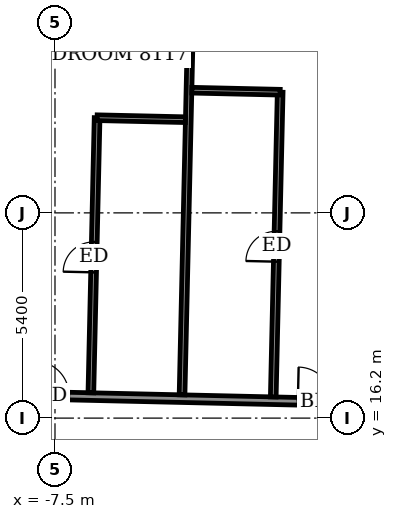
"""IFC4 building model, lengths in metres.
Left out: names, types, materials, properties, quantities, classifications, styles, units other than length and angle.
Written with IfcOpenShell. Run it as: python <this file> out.ifc"""

import sys

from ifc_helpers import new_model, si_unit, direction, frame, frame_2d, origin, place, context, subcontext, project, spatial, rectangle, extrude, element, fill, save


model = new_model("IFC4")
c1 = context("Model", 3, precision=1e-05, world=origin(), true_north=direction((0.0, 1.0)))
c2 = subcontext(c1, "Body", "Model", "MODEL_VIEW")
j1 = project(units=[si_unit("LENGTHUNIT", "METRE"), si_unit("PLANEANGLEUNIT", "RADIAN")], contexts=[c1])
p1 = place(None, origin())
s1 = spatial("IfcSite", under=j1, at=p1, CompositionType="ELEMENT")
p2 = place(p1, origin())
s2 = spatial("IfcBuilding", under=s1, at=p2, CompositionType="ELEMENT")
p3 = place(p2, frame((0.0, 0.0, 316.9)))
s3 = spatial("IfcBuildingStorey", under=s2, at=p3, CompositionType="ELEMENT", Elevation=316.9)
p4 = place(p3, frame((-30.652, 17.313, 0.0), z_axis=(0.0, 0.0, 1.0), x_axis=(0.999742623764, -0.02268669719, 0.0)))
e1 = element("IfcWall", 1, at=p4, inside=s3, PredefinedType="PARTITIONING", context=c2, shape_type="SweptSolid", body=[
    extrude(rectangle(XDim=58.8, YDim=0.2, at=frame_2d((29.4, 0.0))), origin(), (0.0, 0.0, 1.0), 3.05),
])
p5 = place(p4, frame((55.698, 0.0, 0.0)))
e2 = element("IfcOpeningElement", 2, at=p5, cuts=e1, PredefinedType="OPENING", context=c2, shape_type="SweptSolid", body=[
    extrude(rectangle(XDim=1.0, YDim=2.1, at=frame_2d((0.5, 1.05))), frame((0.0, 0.11, 0.0), z_axis=(0.0, -1.0, 0.0), x_axis=(1.0, 0.0, 0.0)), (0.0, 0.0, 1.0), 0.22),
])
p6 = place(p4, frame((49.0, 0.0, 0.0)))
e3 = element("IfcOpeningElement", 3, at=p6, cuts=e1, PredefinedType="OPENING", context=c2, shape_type="SweptSolid", body=[
    extrude(rectangle(XDim=0.9, YDim=2.1, at=frame_2d((0.45, 1.05))), frame((0.0, 0.11, 0.0), z_axis=(0.0, -1.0, 0.0), x_axis=(1.0, 0.0, 0.0)), (0.0, 0.0, 1.0), 0.22),
])
p7 = place(p4, frame((47.125, 0.0, 0.0)))
e4 = element("IfcOpeningElement", 4, at=p7, cuts=e1, PredefinedType="OPENING", context=c2, shape_type="SweptSolid", body=[
    extrude(rectangle(XDim=0.9, YDim=2.1, at=frame_2d((0.45, 1.05))), frame((0.0, 0.11, 0.0), z_axis=(0.0, -1.0, 0.0), x_axis=(1.0, 0.0, 0.0)), (0.0, 0.0, 1.0), 0.22),
])
p8 = place(p4, frame((40.425, 0.0, 0.0)))
e5 = element("IfcOpeningElement", 5, at=p8, cuts=e1, PredefinedType="OPENING", context=c2, shape_type="SweptSolid", body=[
    extrude(rectangle(XDim=0.9, YDim=2.1, at=frame_2d((0.45, 1.05))), frame((0.0, 0.11, 0.0), z_axis=(0.0, -1.0, 0.0), x_axis=(1.0, 0.0, 0.0)), (0.0, 0.0, 1.0), 0.22),
])
p9 = place(p4, frame((38.4, 0.0, 0.0)))
e6 = element("IfcOpeningElement", 6, at=p9, cuts=e1, PredefinedType="OPENING", context=c2, shape_type="SweptSolid", body=[
    extrude(rectangle(XDim=0.9, YDim=2.1, at=frame_2d((0.45, 1.05))), frame((0.0, 0.11, 0.0), z_axis=(0.0, -1.0, 0.0), x_axis=(1.0, 0.0, 0.0)), (0.0, 0.0, 1.0), 0.22),
])
p10 = place(p4, frame((31.6, 0.0, 0.0)))
e7 = element("IfcOpeningElement", 7, at=p10, cuts=e1, PredefinedType="OPENING", context=c2, shape_type="SweptSolid", body=[
    extrude(rectangle(XDim=0.9, YDim=2.1, at=frame_2d((0.45, 1.05))), frame((0.0, 0.11, 0.0), z_axis=(0.0, -1.0, 0.0), x_axis=(1.0, 0.0, 0.0)), (0.0, 0.0, 1.0), 0.22),
])
p11 = place(p4, frame((29.55, 0.0, 0.0)))
e8 = element("IfcOpeningElement", 8, at=p11, cuts=e1, PredefinedType="OPENING", context=c2, shape_type="SweptSolid", body=[
    extrude(rectangle(XDim=0.9, YDim=2.1, at=frame_2d((0.45, 1.05))), frame((0.0, 0.11, 0.0), z_axis=(0.0, -1.0, 0.0), x_axis=(1.0, 0.0, 0.0)), (0.0, 0.0, 1.0), 0.22),
])
p12 = place(p4, frame((22.625, 0.0, 0.0)))
e9 = element("IfcOpeningElement", 9, at=p12, cuts=e1, PredefinedType="OPENING", context=c2, shape_type="SweptSolid", body=[
    extrude(rectangle(XDim=0.9, YDim=2.1, at=frame_2d((0.45, 1.05))), frame((0.0, 0.11, 0.0), z_axis=(0.0, -1.0, 0.0), x_axis=(1.0, 0.0, 0.0)), (0.0, 0.0, 1.0), 0.22),
])
p13 = place(p4, frame((20.625, 0.0, 0.0)))
e10 = element("IfcOpeningElement", 10, at=p13, cuts=e1, PredefinedType="OPENING", context=c2, shape_type="SweptSolid", body=[
    extrude(rectangle(XDim=0.9, YDim=2.1, at=frame_2d((0.45, 1.05))), frame((0.0, 0.11, 0.0), z_axis=(0.0, -1.0, 0.0), x_axis=(1.0, 0.0, 0.0)), (0.0, 0.0, 1.0), 0.22),
])
p14 = place(p4, frame((13.825, 0.0, 0.0)))
e11 = element("IfcOpeningElement", 11, at=p14, cuts=e1, PredefinedType="OPENING", context=c2, shape_type="SweptSolid", body=[
    extrude(rectangle(XDim=0.9, YDim=2.1, at=frame_2d((0.45, 1.05))), frame((0.0, 0.11, 0.0), z_axis=(0.0, -1.0, 0.0), x_axis=(1.0, 0.0, 0.0)), (0.0, 0.0, 1.0), 0.22),
])
p15 = place(p4, frame((11.725, 0.0, 0.0)))
e12 = element("IfcOpeningElement", 12, at=p15, cuts=e1, PredefinedType="OPENING", context=c2, shape_type="SweptSolid", body=[
    extrude(rectangle(XDim=0.9, YDim=2.1, at=frame_2d((0.45, 1.05))), frame((0.0, 0.11, 0.0), z_axis=(0.0, -1.0, 0.0), x_axis=(1.0, 0.0, 0.0)), (0.0, 0.0, 1.0), 0.22),
])
p16 = place(p4, frame((1.85, 0.0, 0.0)))
e13 = element("IfcOpeningElement", 13, at=p16, cuts=e1, PredefinedType="OPENING", context=c2, shape_type="SweptSolid", body=[
    extrude(rectangle(XDim=1.0, YDim=2.1, at=frame_2d((0.5, 1.05))), frame((0.0, 0.11, 0.0), z_axis=(0.0, -1.0, 0.0), x_axis=(1.0, 0.0, 0.0)), (0.0, 0.0, 1.0), 0.22),
])
p17 = place(p4, frame((6.95, 0.0, 0.0)))
e14 = element("IfcOpeningElement", 14, at=p17, cuts=e1, PredefinedType="OPENING", context=c2, shape_type="SweptSolid", body=[
    extrude(rectangle(XDim=0.9, YDim=2.1, at=frame_2d((0.45, 1.05))), frame((0.0, 0.11, 0.0), z_axis=(0.0, -1.0, 0.0), x_axis=(1.0, 0.0, 0.0)), (0.0, 0.0, 1.0), 0.22),
])
p18 = place(p3, frame((-6.556, 16.866, 0.0), z_axis=(0.0, 0.0, 1.0), x_axis=(0.022627186748, 0.999743972435, 0.0)))
e15 = element("IfcWall", 15, at=p18, inside=s3, PredefinedType="PARTITIONING", context=c2, shape_type="SweptSolid", body=[
    extrude(rectangle(XDim=7.24, YDim=0.15, at=frame_2d((3.62, 0.0))), origin(), (0.0, 0.0, 1.0), 3.05),
])
p19 = place(p18, frame((3.17, 0.0, 0.0)))
e16 = element("IfcOpeningElement", 16, at=p19, cuts=e15, PredefinedType="OPENING", context=c2, shape_type="SweptSolid", body=[
    extrude(rectangle(XDim=0.8, YDim=2.1, at=frame_2d((0.4, 1.05))), frame((0.0, 0.085, 0.0), z_axis=(0.0, -1.0, 0.0), x_axis=(1.0, 0.0, 0.0)), (0.0, 0.0, 1.0), 0.17),
])
p20 = place(p3, frame((-4.157, 16.812, 0.0), z_axis=(0.0, 0.0, 1.0), x_axis=(0.022740189192, 0.999741408463, 0.0)))
e17 = element("IfcWall", 17, at=p20, inside=s3, PredefinedType="PARTITIONING", context=c2, shape_type="SweptSolid", body=[
    extrude(rectangle(XDim=12.4, YDim=0.15, at=frame_2d((6.2, 0.0))), origin(), (0.0, 0.0, 1.0), 2.45),
])
p21 = place(p3, frame((-1.757, 16.757, 0.0), z_axis=(0.0, 0.0, 1.0), x_axis=(0.022709649785, 0.999742102648, 0.0)))
e18 = element("IfcWall", 18, at=p21, inside=s3, PredefinedType="PARTITIONING", context=c2, shape_type="SweptSolid", body=[
    extrude(rectangle(XDim=8.02, YDim=0.15, at=frame_2d((4.01, 0.0))), origin(), (0.0, 0.0, 1.0), 3.05),
])
p22 = place(p21, frame((3.56, 0.0, 0.0)))
e19 = element("IfcOpeningElement", 19, at=p22, cuts=e18, PredefinedType="OPENING", context=c2, shape_type="SweptSolid", body=[
    extrude(rectangle(XDim=0.8, YDim=2.1, at=frame_2d((0.4, 1.05))), frame((0.0, 0.085, 0.0), z_axis=(0.0, -1.0, 0.0), x_axis=(1.0, 0.0, 0.0)), (0.0, 0.0, 1.0), 0.17),
])
p23 = place(p3, frame((-6.392, 24.104, 0.0), z_axis=(0.0, 0.0, 1.0), x_axis=(0.999750007167, -0.022358961731, 0.0)))
e20 = element("IfcWall", 20, at=p23, inside=s3, PredefinedType="PARTITIONING", context=c2, shape_type="SweptSolid", body=[
    extrude(rectangle(XDim=2.326, YDim=0.15, at=frame_2d((1.163, 0.0))), origin(), (0.0, 0.0, 1.0), 3.05),
])
p24 = place(p3, frame((-3.9, 24.828, 0.0), z_axis=(0.0, 0.0, 1.0), x_axis=(0.999740478815, -0.022781023197, 0.0)))
e21 = element("IfcWall", 21, at=p24, inside=s3, PredefinedType="PARTITIONING", context=c2, shape_type="SweptSolid", body=[
    extrude(rectangle(XDim=2.325, YDim=0.15, at=frame_2d((1.163, 0.0))), origin(), (0.0, 0.0, 1.0), 3.05),
])
p25 = place(p11, origin())
e22 = element("IfcDoor", 22, at=p25, inside=s3, OperationType="SINGLE_SWING_RIGHT", PredefinedType="DOOR", context=c2, shape_type="SweptSolid", body=[
    extrude(rectangle(XDim=0.9, YDim=2.1, at=frame_2d((0.45, 1.05))), frame((0.0, 0.025, 0.0), z_axis=(0.0, -1.0, 0.0), x_axis=(1.0, 0.0, 0.0)), (0.0, 0.0, 1.0), 0.05),
])
fill(e8, e22)
p26 = place(p22, origin())
e23 = element("IfcDoor", 23, at=p26, inside=s3, OperationType="SINGLE_SWING_RIGHT", PredefinedType="DOOR", context=c2, shape_type="SweptSolid", body=[
    extrude(rectangle(XDim=0.8, YDim=2.1, at=frame_2d((0.4, 1.05))), frame((0.0, 0.025, 0.0), z_axis=(0.0, -1.0, 0.0), x_axis=(1.0, 0.0, 0.0)), (0.0, 0.0, 1.0), 0.05),
])
fill(e19, e23)
p27 = place(p12, origin())
e24 = element("IfcDoor", 24, at=p27, inside=s3, OperationType="SINGLE_SWING_LEFT", PredefinedType="DOOR", context=c2, shape_type="SweptSolid", body=[
    extrude(rectangle(XDim=0.9, YDim=2.1, at=frame_2d((0.45, 1.05))), frame((0.0, 0.025, 0.0), z_axis=(0.0, -1.0, 0.0), x_axis=(1.0, 0.0, 0.0)), (0.0, 0.0, 1.0), 0.05),
])
fill(e9, e24)
p28 = place(p19, origin())
e25 = element("IfcDoor", 25, at=p28, inside=s3, OperationType="SINGLE_SWING_LEFT", PredefinedType="DOOR", context=c2, shape_type="SweptSolid", body=[
    extrude(rectangle(XDim=0.8, YDim=2.1, at=frame_2d((0.4, 1.05))), frame((0.0, 0.025, 0.0), z_axis=(0.0, -1.0, 0.0), x_axis=(1.0, 0.0, 0.0)), (0.0, 0.0, 1.0), 0.05),
])
fill(e16, e25)
save(model, sys.argv[1])
